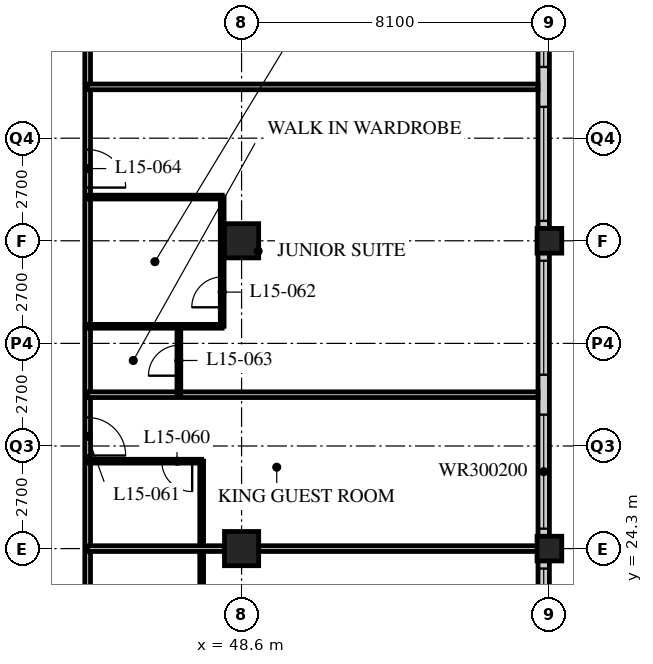
"""IFC4 building model, lengths in metres.
Left out: names, types, materials, properties, quantities, classifications, styles, units other than length and angle.
Written with IfcOpenShell. Run it as: python <this file> out.ifc"""

import sys

from ifc_helpers import new_model, si_unit, direction, frame, frame_2d, origin, origin_2d, place, context, subcontext, project, spatial, rectangle, hollow_rectangle, extrude, element, fill, save


model = new_model("IFC4")
c1 = context("Model", 3, precision=1e-05, world=origin(), true_north=direction((0.0, 1.0)))
c2 = subcontext(c1, "Body", "Model", "MODEL_VIEW")
j1 = project(units=[si_unit("LENGTHUNIT", "METRE"), si_unit("PLANEANGLEUNIT", "RADIAN")], contexts=[c1])
p1 = place(None, origin())
s1 = spatial("IfcSite", under=j1, at=p1, CompositionType="ELEMENT")
p2 = place(p1, origin())
s2 = spatial("IfcBuilding", under=s1, at=p2, CompositionType="ELEMENT")
p3 = place(p2, frame((0.0, 0.0, 63.6)))
s3 = spatial("IfcBuildingStorey", under=s2, at=p3, CompositionType="ELEMENT", Elevation=63.6)
for number, where, z_axis, x_axis in (
    (1, (48.6, 24.3, 0.0), (0.0, 0.0, 1.0), (1.0, 0.0, 0.0)),
    (2, (48.6, 32.4, 0.0), (0.0, 0.0, 1.0), (1.0, 0.0, 0.0)),
):
    element("IfcColumn", number, at=place(p3, frame(where, z_axis=z_axis, x_axis=x_axis)), inside=s3, PredefinedType="COLUMN", context=c2, shape_type="SweptSolid", body=[
        extrude(hollow_rectangle(XDim=0.9, YDim=0.9, WallThickness=0.09, at=origin_2d()), origin(), (0.0, 0.0, 1.0), 3.4),
    ])
for number, where, z_axis, x_axis in (
    (3, (56.7, 24.3, 0.0), (0.0, 0.0, 1.0), (1.0, 0.0, 0.0)),
    (4, (56.7, 32.4, 0.0), (0.0, 0.0, 1.0), (1.0, 0.0, 0.0)),
):
    element("IfcColumn", number, at=place(p3, frame(where, z_axis=z_axis, x_axis=x_axis)), inside=s3, PredefinedType="COLUMN", context=c2, shape_type="SweptSolid", body=[
        extrude(hollow_rectangle(XDim=0.65, YDim=0.65, WallThickness=0.05, at=origin_2d()), origin(), (0.0, 0.0, 1.0), 3.4),
    ])
p4 = place(p3, frame((56.55, 8.4, 0.0), z_axis=(0.0, 0.0, 1.0), x_axis=(0.0, 1.0, 0.0)))
e5 = element("IfcWall", 5, at=p4, inside=s3, PredefinedType="SOLIDWALL", context=c2, shape_type="SweptSolid", body=[
    extrude(rectangle(XDim=32.1, YDim=0.3, at=frame_2d((16.05, 0.0))), origin(), (0.0, 0.0, 1.0), 3.19),
])
p5 = place(p4, frame((0.225, 0.0, 0.9)))
e6 = element("IfcOpeningElement", 6, at=p5, cuts=e5, PredefinedType="OPENING", context=c2, shape_type="SweptSolid", body=[
    extrude(rectangle(XDim=3.0, YDim=2.0, at=frame_2d((1.5, 1.0))), frame((0.0, 0.16, 0.0), z_axis=(0.0, -1.0, 0.0), x_axis=(1.0, 0.0, 0.0)), (0.0, 0.0, 1.0), 0.32),
])
p6 = place(p4, frame((4.275, 0.0, 0.9)))
e7 = element("IfcOpeningElement", 7, at=p6, cuts=e5, PredefinedType="OPENING", context=c2, shape_type="SweptSolid", body=[
    extrude(rectangle(XDim=3.0, YDim=2.0, at=frame_2d((1.5, 1.0))), frame((0.0, 0.16, 0.0), z_axis=(0.0, -1.0, 0.0), x_axis=(1.0, 0.0, 0.0)), (0.0, 0.0, 1.0), 0.32),
])
p7 = place(p4, frame((8.325, 0.0, 0.9)))
e8 = element("IfcOpeningElement", 8, at=p7, cuts=e5, PredefinedType="OPENING", context=c2, shape_type="SweptSolid", body=[
    extrude(rectangle(XDim=3.0, YDim=2.0, at=frame_2d((1.5, 1.0))), frame((0.0, 0.16, 0.0), z_axis=(0.0, -1.0, 0.0), x_axis=(1.0, 0.0, 0.0)), (0.0, 0.0, 1.0), 0.32),
])
p8 = place(p4, frame((12.375, 0.0, 0.9)))
e9 = element("IfcOpeningElement", 9, at=p8, cuts=e5, PredefinedType="OPENING", context=c2, shape_type="SweptSolid", body=[
    extrude(rectangle(XDim=3.0, YDim=2.0, at=frame_2d((1.5, 1.0))), frame((0.0, 0.16, 0.0), z_axis=(0.0, -1.0, 0.0), x_axis=(1.0, 0.0, 0.0)), (0.0, 0.0, 1.0), 0.32),
])
p9 = place(p4, frame((16.425, 0.0, 0.9)))
e10 = element("IfcOpeningElement", 10, at=p9, cuts=e5, PredefinedType="OPENING", context=c2, shape_type="SweptSolid", body=[
    extrude(rectangle(XDim=3.0, YDim=2.0, at=frame_2d((1.5, 1.0))), frame((0.0, 0.16, 0.0), z_axis=(0.0, -1.0, 0.0), x_axis=(1.0, 0.0, 0.0)), (0.0, 0.0, 1.0), 0.32),
])
p10 = place(p4, frame((20.475, 0.0, 0.9)))
e11 = element("IfcOpeningElement", 11, at=p10, cuts=e5, PredefinedType="OPENING", context=c2, shape_type="SweptSolid", body=[
    extrude(rectangle(XDim=3.0, YDim=2.0, at=frame_2d((1.5, 1.0))), frame((0.0, 0.16, 0.0), z_axis=(0.0, -1.0, 0.0), x_axis=(1.0, 0.0, 0.0)), (0.0, 0.0, 1.0), 0.32),
])
p11 = place(p4, frame((24.525, 0.0, 0.9)))
e12 = element("IfcOpeningElement", 12, at=p11, cuts=e5, PredefinedType="OPENING", context=c2, shape_type="SweptSolid", body=[
    extrude(rectangle(XDim=3.0, YDim=2.0, at=frame_2d((1.5, 1.0))), frame((0.0, 0.16, 0.0), z_axis=(0.0, -1.0, 0.0), x_axis=(1.0, 0.0, 0.0)), (0.0, 0.0, 1.0), 0.32),
])
p12 = place(p4, frame((28.575, 0.0, 0.9)))
e13 = element("IfcOpeningElement", 13, at=p12, cuts=e5, PredefinedType="OPENING", context=c2, shape_type="SweptSolid", body=[
    extrude(rectangle(XDim=3.0, YDim=2.0, at=frame_2d((1.5, 1.0))), frame((0.0, 0.16, 0.0), z_axis=(0.0, -1.0, 0.0), x_axis=(1.0, 0.0, 0.0)), (0.0, 0.0, 1.0), 0.32),
])
p13 = place(p3, frame((44.55, 12.15, 0.0), z_axis=(0.0, 0.0, 1.0), x_axis=(0.0, 1.0, 0.0)))
e14 = element("IfcWall", 14, at=p13, inside=s3, PredefinedType="PARTITIONING", context=c2, shape_type="SweptSolid", body=[
    extrude(rectangle(XDim=30.15, YDim=0.15, at=frame_2d((15.075, 0.0))), origin(), (0.0, 0.0, 1.0), 3.19),
])
p14 = place(p13, frame((2.45, 0.0, 0.0)))
e15 = element("IfcOpeningElement", 15, at=p14, cuts=e14, PredefinedType="OPENING", context=c2, shape_type="SweptSolid", body=[
    extrude(rectangle(XDim=1.0, YDim=2.1, at=frame_2d((0.5, 1.05))), frame((0.0, 0.085, 0.0), z_axis=(0.0, -1.0, 0.0), x_axis=(1.0, 0.0, 0.0)), (0.0, 0.0, 1.0), 0.17),
])
p15 = place(p13, frame((4.35, 0.0, 0.0)))
e16 = element("IfcOpeningElement", 16, at=p15, cuts=e14, PredefinedType="OPENING", context=c2, shape_type="SweptSolid", body=[
    extrude(rectangle(XDim=1.0, YDim=2.1, at=frame_2d((0.5, 1.05))), frame((0.0, 0.085, 0.0), z_axis=(0.0, -1.0, 0.0), x_axis=(1.0, 0.0, 0.0)), (0.0, 0.0, 1.0), 0.17),
])
p16 = place(p13, frame((8.4, 0.0, 0.0)))
e17 = element("IfcOpeningElement", 17, at=p16, cuts=e14, PredefinedType="OPENING", context=c2, shape_type="SweptSolid", body=[
    extrude(rectangle(XDim=1.0, YDim=2.1, at=frame_2d((0.5, 1.05))), frame((0.0, 0.085, 0.0), z_axis=(0.0, -1.0, 0.0), x_axis=(1.0, 0.0, 0.0)), (0.0, 0.0, 1.0), 0.17),
])
p17 = place(p13, frame((14.6, 0.0, 0.0)))
e18 = element("IfcOpeningElement", 18, at=p17, cuts=e14, PredefinedType="OPENING", context=c2, shape_type="SweptSolid", body=[
    extrude(rectangle(XDim=1.0, YDim=2.1, at=frame_2d((0.5, 1.05))), frame((0.0, 0.085, 0.0), z_axis=(0.0, -1.0, 0.0), x_axis=(1.0, 0.0, 0.0)), (0.0, 0.0, 1.0), 0.17),
])
p18 = place(p13, frame((21.65, 0.0, 0.0)))
e19 = element("IfcOpeningElement", 19, at=p18, cuts=e14, PredefinedType="OPENING", context=c2, shape_type="SweptSolid", body=[
    extrude(rectangle(XDim=1.0, YDim=2.1, at=frame_2d((0.5, 1.05))), frame((0.0, 0.085, 0.0), z_axis=(0.0, -1.0, 0.0), x_axis=(1.0, 0.0, 0.0)), (0.0, 0.0, 1.0), 0.17),
])
p19 = place(p13, frame((26.7, 0.0, 0.0)))
e20 = element("IfcOpeningElement", 20, at=p19, cuts=e14, PredefinedType="OPENING", context=c2, shape_type="SweptSolid", body=[
    extrude(rectangle(XDim=1.0, YDim=2.1, at=frame_2d((0.5, 1.05))), frame((0.0, 0.085, 0.0), z_axis=(0.0, -1.0, 0.0), x_axis=(1.0, 0.0, 0.0)), (0.0, 0.0, 1.0), 0.17),
])
p20 = place(p3, frame((47.55, 21.7, 0.0), z_axis=(0.0, 0.0, 1.0), x_axis=(0.0, 1.0, 0.0)))
e21 = element("IfcWall", 21, at=p20, inside=s3, PredefinedType="PARTITIONING", context=c2, shape_type="SweptSolid", body=[
    extrude(rectangle(XDim=4.9, YDim=0.1, at=frame_2d((2.45, 0.0))), origin(), (0.0, 0.0, 1.0), 3.19),
])
p21 = place(p3, frame((44.55, 24.3, 0.0), z_axis=(0.0, 0.0, 1.0), x_axis=(1.0, 0.0, 0.0)))
e22 = element("IfcWall", 22, at=p21, inside=s3, PredefinedType="PARTITIONING", context=c2, shape_type="SweptSolid", body=[
    extrude(rectangle(XDim=11.85, YDim=0.15, at=frame_2d((5.925, 0.0))), origin(), (0.0, 0.0, 1.0), 2.578),
])
p22 = place(p3, frame((44.55, 26.6, 0.0), z_axis=(0.0, 0.0, 1.0), x_axis=(1.0, 0.0, 0.0)))
e23 = element("IfcWall", 23, at=p22, inside=s3, PredefinedType="PARTITIONING", context=c2, shape_type="SweptSolid", body=[
    extrude(rectangle(XDim=3.0, YDim=0.1, at=frame_2d((1.5, 0.0))), origin(), (0.0, 0.0, 1.0), 3.19),
])
p23 = place(p22, frame((1.95, 0.0, 0.0)))
e24 = element("IfcOpeningElement", 24, at=p23, cuts=e23, PredefinedType="OPENING", context=c2, shape_type="SweptSolid", body=[
    extrude(rectangle(XDim=0.8, YDim=2.1, at=frame_2d((0.4, 1.05))), frame((0.0, 0.06, 0.0), z_axis=(0.0, -1.0, 0.0), x_axis=(1.0, 0.0, 0.0)), (0.0, 0.0, 1.0), 0.12),
])
p24 = place(p3, frame((44.55, 28.35, 0.0), z_axis=(0.0, 0.0, 1.0), x_axis=(1.0, 0.0, 0.0)))
e25 = element("IfcWall", 25, at=p24, inside=s3, PredefinedType="PARTITIONING", context=c2, shape_type="SweptSolid", body=[
    extrude(rectangle(XDim=11.85, YDim=0.15, at=frame_2d((5.925, 0.0))), origin(), (0.0, 0.0, 1.0), 3.19),
])
p25 = place(p3, frame((48.09, 30.15, 0.0), z_axis=(0.0, 0.0, 1.0), x_axis=(0.0, 1.0, 0.0)))
e26 = element("IfcWall", 26, at=p25, inside=s3, PredefinedType="PARTITIONING", context=c2, shape_type="SweptSolid", body=[
    extrude(rectangle(XDim=3.4, YDim=0.1, at=frame_2d((1.7, 0.0))), origin(), (0.0, 0.0, 1.0), 3.19),
])
p26 = place(p25, frame((0.5, 0.0, 0.0)))
e27 = element("IfcOpeningElement", 27, at=p26, cuts=e26, PredefinedType="OPENING", context=c2, shape_type="SweptSolid", body=[
    extrude(rectangle(XDim=0.8, YDim=2.1, at=frame_2d((0.4, 1.05))), frame((0.0, 0.06, 0.0), z_axis=(0.0, -1.0, 0.0), x_axis=(1.0, 0.0, 0.0)), (0.0, 0.0, 1.0), 0.12),
])
p27 = place(p3, frame((46.95, 28.35, 0.0), z_axis=(0.0, 0.0, 1.0), x_axis=(0.0, 1.0, 0.0)))
e28 = element("IfcWall", 28, at=p27, inside=s3, PredefinedType="PARTITIONING", context=c2, shape_type="SweptSolid", body=[
    extrude(rectangle(XDim=1.8, YDim=0.1, at=frame_2d((0.9, 0.0))), origin(), (0.0, 0.0, 1.0), 3.19),
])
p28 = place(p27, frame((0.5, 0.0, 0.0)))
e29 = element("IfcOpeningElement", 29, at=p28, cuts=e28, PredefinedType="OPENING", context=c2, shape_type="SweptSolid", body=[
    extrude(rectangle(XDim=0.8, YDim=2.1, at=frame_2d((0.4, 1.05))), frame((0.0, 0.06, 0.0), z_axis=(0.0, -1.0, 0.0), x_axis=(1.0, 0.0, 0.0)), (0.0, 0.0, 1.0), 0.12),
])
for number, where, z_axis, x_axis in (
    (30, (44.55, 30.15, 0.0), (0.0, 0.0, 1.0), (1.0, 0.0, 0.0)),
    (31, (44.55, 33.55, 0.0), (0.0, 0.0, 1.0), (1.0, 0.0, 0.0)),
):
    element("IfcWall", number, at=place(p3, frame(where, z_axis=z_axis, x_axis=x_axis)), inside=s3, PredefinedType="PARTITIONING", context=c2, shape_type="SweptSolid", body=[
        extrude(rectangle(XDim=3.54, YDim=0.1, at=frame_2d((1.77, 0.0))), origin(), (0.0, 0.0, 1.0), 3.19),
    ])
p29 = place(p3, frame((44.55, 36.45, 0.0), z_axis=(0.0, 0.0, 1.0), x_axis=(1.0, 0.0, 0.0)))
e32 = element("IfcWall", 32, at=p29, inside=s3, PredefinedType="PARTITIONING", context=c2, shape_type="SweptSolid", body=[
    extrude(rectangle(XDim=11.85, YDim=0.15, at=frame_2d((5.925, 0.0))), origin(), (0.0, 0.0, 1.0), 3.19),
])
p30 = place(p8, origin())
e33 = element("IfcWindow", 33, at=p30, inside=s3, PartitioningType="SINGLE_PANEL", PredefinedType="WINDOW", context=c2, shape_type="SweptSolid", body=[
    extrude(rectangle(XDim=3.0, YDim=2.0, at=frame_2d((1.5, 1.0))), frame((0.0, 0.03, 0.0), z_axis=(0.0, -1.0, 0.0), x_axis=(1.0, 0.0, 0.0)), (0.0, 0.0, 1.0), 0.06),
])
fill(e9, e33)
p31 = place(p9, origin())
e34 = element("IfcWindow", 34, at=p31, inside=s3, PartitioningType="SINGLE_PANEL", PredefinedType="WINDOW", context=c2, shape_type="SweptSolid", body=[
    extrude(rectangle(XDim=3.0, YDim=2.0, at=frame_2d((1.5, 1.0))), frame((0.0, 0.03, 0.0), z_axis=(0.0, -1.0, 0.0), x_axis=(1.0, 0.0, 0.0)), (0.0, 0.0, 1.0), 0.06),
])
fill(e10, e34)
p32 = place(p10, origin())
e35 = element("IfcWindow", 35, at=p32, inside=s3, PartitioningType="SINGLE_PANEL", PredefinedType="WINDOW", context=c2, shape_type="SweptSolid", body=[
    extrude(rectangle(XDim=3.0, YDim=2.0, at=frame_2d((1.5, 1.0))), frame((0.0, 0.03, 0.0), z_axis=(0.0, -1.0, 0.0), x_axis=(1.0, 0.0, 0.0)), (0.0, 0.0, 1.0), 0.06),
])
fill(e11, e35)
p33 = place(p11, origin())
e36 = element("IfcWindow", 36, at=p33, inside=s3, PartitioningType="SINGLE_PANEL", PredefinedType="WINDOW", context=c2, shape_type="SweptSolid", body=[
    extrude(rectangle(XDim=3.0, YDim=2.0, at=frame_2d((1.5, 1.0))), frame((0.0, 0.03, 0.0), z_axis=(0.0, -1.0, 0.0), x_axis=(1.0, 0.0, 0.0)), (0.0, 0.0, 1.0), 0.06),
])
fill(e12, e36)
p34 = place(p12, origin())
e37 = element("IfcWindow", 37, at=p34, inside=s3, PartitioningType="SINGLE_PANEL", PredefinedType="WINDOW", context=c2, shape_type="SweptSolid", body=[
    extrude(rectangle(XDim=3.0, YDim=2.0, at=frame_2d((1.5, 1.0))), frame((0.0, 0.03, 0.0), z_axis=(0.0, -1.0, 0.0), x_axis=(1.0, 0.0, 0.0)), (0.0, 0.0, 1.0), 0.06),
])
fill(e13, e37)
p35 = place(p23, origin())
e38 = element("IfcDoor", 38, at=p35, inside=s3, OperationType="SINGLE_SWING_LEFT", PredefinedType="DOOR", context=c2, shape_type="SweptSolid", body=[
    extrude(rectangle(XDim=0.8, YDim=2.1, at=frame_2d((0.4, 1.05))), frame((0.0, 0.025, 0.0), z_axis=(0.0, -1.0, 0.0), x_axis=(1.0, 0.0, 0.0)), (0.0, 0.0, 1.0), 0.05),
])
fill(e24, e38)
p36 = place(p17, origin())
e39 = element("IfcDoor", 39, at=p36, inside=s3, OperationType="SINGLE_SWING_RIGHT", PredefinedType="DOOR", context=c2, shape_type="SweptSolid", body=[
    extrude(rectangle(XDim=1.0, YDim=2.1, at=frame_2d((0.5, 1.05))), frame((0.0, 0.025, 0.0), z_axis=(0.0, -1.0, 0.0), x_axis=(1.0, 0.0, 0.0)), (0.0, 0.0, 1.0), 0.05),
])
fill(e18, e39)
p37 = place(p26, origin())
e40 = element("IfcDoor", 40, at=p37, inside=s3, OperationType="SINGLE_SWING_LEFT", PredefinedType="DOOR", context=c2, shape_type="SweptSolid", body=[
    extrude(rectangle(XDim=0.8, YDim=2.1, at=frame_2d((0.4, 1.05))), frame((0.0, 0.025, 0.0), z_axis=(0.0, -1.0, 0.0), x_axis=(1.0, 0.0, 0.0)), (0.0, 0.0, 1.0), 0.05),
])
fill(e27, e40)
p38 = place(p28, origin())
e41 = element("IfcDoor", 41, at=p38, inside=s3, OperationType="SINGLE_SWING_LEFT", PredefinedType="DOOR", context=c2, shape_type="SweptSolid", body=[
    extrude(rectangle(XDim=0.8, YDim=2.1, at=frame_2d((0.4, 1.05))), frame((0.0, 0.025, 0.0), z_axis=(0.0, -1.0, 0.0), x_axis=(1.0, 0.0, 0.0)), (0.0, 0.0, 1.0), 0.05),
])
fill(e29, e41)
p39 = place(p18, origin())
e42 = element("IfcDoor", 42, at=p39, inside=s3, OperationType="SINGLE_SWING_RIGHT", PredefinedType="DOOR", context=c2, shape_type="SweptSolid", body=[
    extrude(rectangle(XDim=1.0, YDim=2.1, at=frame_2d((0.5, 1.05))), frame((0.0, 0.025, 0.0), z_axis=(0.0, -1.0, 0.0), x_axis=(1.0, 0.0, 0.0)), (0.0, 0.0, 1.0), 0.05),
])
fill(e19, e42)
save(model, sys.argv[1])
